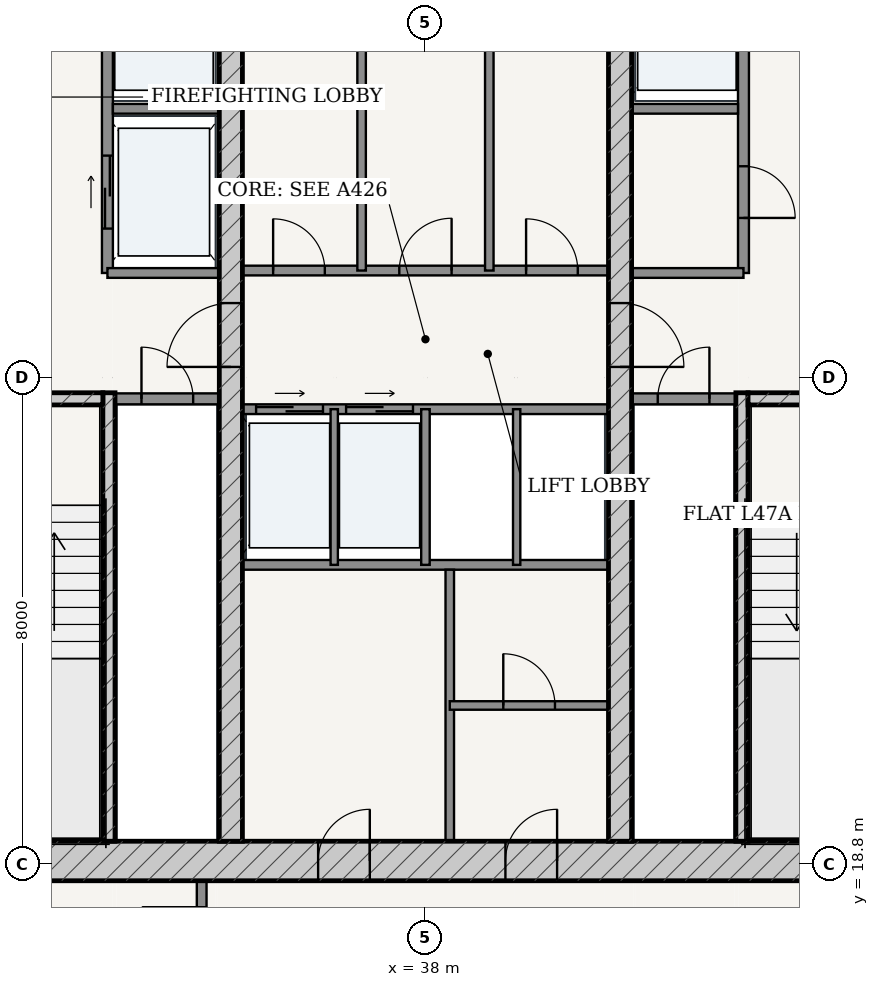
"""IFC4 building model, lengths in metres.
Left out: names, types, materials, properties, quantities, classifications, styles, units other than length and angle.
Written with IfcOpenShell. Run it as: python <this file> out.ifc"""

import sys

from ifc_helpers import new_model, si_unit, direction, frame, frame_2d, origin, place, context, subcontext, project, spatial, rectangle, extrude, source, transform, mapped, element, fill, save


model = new_model("IFC4")
c1 = context("Model", 3, precision=1e-05, world=origin(), true_north=direction((-0.2419218956, 0.970295726276)))
c2 = subcontext(c1, "Body", "Model", "MODEL_VIEW")
j1 = project(units=[si_unit("LENGTHUNIT", "METRE"), si_unit("PLANEANGLEUNIT", "RADIAN")], contexts=[c1])
p1 = place(None, origin())
s1 = spatial("IfcSite", under=j1, at=p1, CompositionType="ELEMENT")
p2 = place(p1, origin())
s2 = spatial("IfcBuilding", under=s1, at=p2, CompositionType="ELEMENT")
p3 = place(p2, frame((0.0, 0.0, 178.6)))
s3 = spatial("IfcBuildingStorey", under=s2, at=p3, CompositionType="ELEMENT", Elevation=178.6)
p4 = place(p3, frame((28.725, 18.85, 0.0), z_axis=(0.0, 0.0, 1.0), x_axis=(1.0, 0.0, 0.0)))
e1 = element("IfcWall", 1, at=p4, inside=s3, PredefinedType="SHEAR", context=c2, shape_type="SweptSolid", body=[
    extrude(rectangle(XDim=18.55, YDim=0.65, at=frame_2d((9.275, 0.0))), origin(), (0.0, 0.0, 1.0), 3.33),
])
p5 = place(p4, frame((7.51, 0.0, 0.0)))
e2 = element("IfcOpeningElement", 2, at=p5, cuts=e1, PredefinedType="OPENING", context=c2, shape_type="SweptSolid", body=[
    extrude(rectangle(XDim=0.85, YDim=2.1, at=frame_2d((0.425, 1.05))), frame((0.0, 0.335, 0.0), z_axis=(0.0, -1.0, 0.0), x_axis=(1.0, 0.0, 0.0)), (0.0, 0.0, 1.0), 0.67),
])
p6 = place(p4, frame((10.59, 0.0, 0.0)))
e3 = element("IfcOpeningElement", 3, at=p6, cuts=e1, PredefinedType="OPENING", context=c2, shape_type="SweptSolid", body=[
    extrude(rectangle(XDim=0.85, YDim=2.1, at=frame_2d((0.425, 1.05))), frame((0.0, 0.335, 0.0), z_axis=(0.0, -1.0, 0.0), x_axis=(1.0, 0.0, 0.0)), (0.0, 0.0, 1.0), 0.67),
])
p7 = place(p3, frame((32.795, 19.175, 0.0), z_axis=(0.0, 0.0, 1.0), x_axis=(0.0, 1.0, 0.0)))
e4 = element("IfcWall", 4, at=p7, inside=s3, PredefinedType="SOLIDWALL", context=c2, shape_type="SweptSolid", body=[
    extrude(rectangle(XDim=7.375, YDim=0.2, at=frame_2d((3.688, 0.0))), origin(), (0.0, 0.0, 1.0), 3.33),
])
p8 = place(p3, frame((29.375, 26.45, 0.0), z_axis=(0.0, 0.0, 1.0), x_axis=(1.0, 0.0, 0.0)))
e5 = element("IfcWall", 5, at=p8, inside=s3, PredefinedType="SOLIDWALL", context=c2, shape_type="SweptSolid", body=[
    extrude(rectangle(XDim=3.32, YDim=0.2, at=frame_2d((1.66, 0.0))), origin(), (0.0, 0.0, 1.0), 3.33),
])
p9 = place(p8, frame((1.185, 0.0, 0.0)))
e6 = element("IfcOpeningElement", 6, at=p9, cuts=e5, PredefinedType="OPENING", context=c2, shape_type="SweptSolid", body=[
    extrude(rectangle(XDim=0.95, YDim=2.15, at=frame_2d((0.475, 1.075))), frame((0.0, 0.11, 0.0), z_axis=(0.0, -1.0, 0.0), x_axis=(1.0, 0.0, 0.0)), (0.0, 0.0, 1.0), 0.22),
])
p10 = place(p3, frame((43.205, 19.175, 0.0), z_axis=(0.0, 0.0, 1.0), x_axis=(0.0, 1.0, 0.0)))
e7 = element("IfcWall", 7, at=p10, inside=s3, PredefinedType="SOLIDWALL", context=c2, shape_type="SweptSolid", body=[
    extrude(rectangle(XDim=7.375, YDim=0.2, at=frame_2d((3.688, 0.0))), origin(), (0.0, 0.0, 1.0), 3.33),
])
p11 = place(p3, frame((43.305, 26.45, 0.0), z_axis=(0.0, 0.0, 1.0), x_axis=(1.0, 0.0, 0.0)))
e8 = element("IfcWall", 8, at=p11, inside=s3, PredefinedType="SOLIDWALL", context=c2, shape_type="SweptSolid", body=[
    extrude(rectangle(XDim=3.32, YDim=0.2, at=frame_2d((1.66, 0.0))), origin(), (0.0, 0.0, 1.0), 3.33),
])
p12 = place(p11, frame((1.185, 0.0, 0.0)))
e9 = element("IfcOpeningElement", 9, at=p12, cuts=e8, PredefinedType="OPENING", context=c2, shape_type="SweptSolid", body=[
    extrude(rectangle(XDim=0.95, YDim=2.15, at=frame_2d((0.475, 1.075))), frame((0.0, 0.11, 0.0), z_axis=(0.0, -1.0, 0.0), x_axis=(1.0, 0.0, 0.0)), (0.0, 0.0, 1.0), 0.22),
])
p13 = place(p3, frame((34.8, 19.175, 0.0), z_axis=(0.0, 0.0, 1.0), x_axis=(0.0, 1.0, 0.0)))
e10 = element("IfcWall", 10, at=p13, inside=s3, PredefinedType="SHEAR", context=c2, shape_type="SweptSolid", body=[
    extrude(rectangle(XDim=15.25, YDim=0.38, at=frame_2d((7.625, 0.0))), origin(), (0.0, 0.0, 1.0), 3.33),
])
p14 = place(p13, frame((7.8, 0.0, 0.0)))
e11 = element("IfcOpeningElement", 11, at=p14, cuts=e10, PredefinedType="OPENING", context=c2, shape_type="SweptSolid", body=[
    extrude(rectangle(XDim=1.05, YDim=2.15, at=frame_2d((0.525, 1.075))), frame((0.0, 0.2, 0.0), z_axis=(0.0, -1.0, 0.0), x_axis=(1.0, 0.0, 0.0)), (0.0, 0.0, 1.0), 0.4),
])
p15 = place(p3, frame((41.2, 19.175, 0.0), z_axis=(0.0, 0.0, 1.0), x_axis=(0.0, 1.0, 0.0)))
e12 = element("IfcWall", 12, at=p15, inside=s3, PredefinedType="SHEAR", context=c2, shape_type="SweptSolid", body=[
    extrude(rectangle(XDim=15.25, YDim=0.38, at=frame_2d((7.625, 0.0))), origin(), (0.0, 0.0, 1.0), 3.33),
])
p16 = place(p15, frame((7.8, 0.0, 0.0)))
e13 = element("IfcOpeningElement", 13, at=p16, cuts=e12, PredefinedType="OPENING", context=c2, shape_type="SweptSolid", body=[
    extrude(rectangle(XDim=1.05, YDim=2.15, at=frame_2d((0.525, 1.075))), frame((0.0, 0.2, 0.0), z_axis=(0.0, -1.0, 0.0), x_axis=(1.0, 0.0, 0.0)), (0.0, 0.0, 1.0), 0.4),
])
p17 = place(p3, frame((32.9, 26.45, 0.0), z_axis=(0.0, 0.0, 1.0), x_axis=(1.0, 0.0, 0.0)))
e14 = element("IfcWall", 14, at=p17, inside=s3, PredefinedType="PARTITIONING", context=c2, shape_type="SweptSolid", body=[
    extrude(rectangle(XDim=1.71, YDim=0.18, at=frame_2d((0.855, 0.0))), origin(), (0.0, 0.0, 1.0), 3.33),
])
p18 = place(p17, frame((0.43, 0.0, 0.0)))
e15 = element("IfcOpeningElement", 15, at=p18, cuts=e14, PredefinedType="OPENING", context=c2, shape_type="SweptSolid", body=[
    extrude(rectangle(XDim=0.85, YDim=2.1, at=frame_2d((0.425, 1.05))), frame((0.0, 0.1, 0.0), z_axis=(0.0, -1.0, 0.0), x_axis=(1.0, 0.0, 0.0)), (0.0, 0.0, 1.0), 0.2),
])
p19 = place(p3, frame((41.39, 26.45, 0.0), z_axis=(0.0, 0.0, 1.0), x_axis=(1.0, 0.0, 0.0)))
e16 = element("IfcWall", 16, at=p19, inside=s3, PredefinedType="PARTITIONING", context=c2, shape_type="SweptSolid", body=[
    extrude(rectangle(XDim=1.71, YDim=0.18, at=frame_2d((0.855, 0.0))), origin(), (0.0, 0.0, 1.0), 3.33),
])
p20 = place(p19, frame((0.43, 0.0, 0.0)))
e17 = element("IfcOpeningElement", 17, at=p20, cuts=e16, PredefinedType="OPENING", context=c2, shape_type="SweptSolid", body=[
    extrude(rectangle(XDim=0.85, YDim=2.1, at=frame_2d((0.425, 1.05))), frame((0.0, 0.1, 0.0), z_axis=(0.0, -1.0, 0.0), x_axis=(1.0, 0.0, 0.0)), (0.0, 0.0, 1.0), 0.2),
])
p21 = place(p3, frame((32.77, 28.52, 0.0), z_axis=(0.0, 0.0, 1.0), x_axis=(0.0, 1.0, 0.0)))
e18 = element("IfcWall", 18, at=p21, inside=s3, PredefinedType="PARTITIONING", context=c2, shape_type="SweptSolid", body=[
    extrude(rectangle(XDim=5.905, YDim=0.18, at=frame_2d((2.953, 0.0))), origin(), (0.0, 0.0, 1.0), 3.33),
])
p22 = place(p21, frame((3.655, 0.0, 0.0)))
e19 = element("IfcOpeningElement", 19, at=p22, cuts=e18, PredefinedType="OPENING", context=c2, shape_type="SweptSolid", body=[
    extrude(rectangle(XDim=1.15, YDim=2.2, at=frame_2d((0.575, 1.1))), frame((0.0, 0.1, 0.0), z_axis=(0.0, -1.0, 0.0), x_axis=(1.0, 0.0, 0.0)), (0.0, 0.0, 1.0), 0.2),
])
p23 = place(p21, frame((0.73, 0.0, 0.0)))
e20 = element("IfcOpeningElement", 20, at=p23, cuts=e18, PredefinedType="OPENING", context=c2, shape_type="SweptSolid", body=[
    extrude(rectangle(XDim=1.2, YDim=2.25, at=frame_2d((0.6, 1.125))), frame((0.0, 0.1, 0.0), z_axis=(0.0, -1.0, 0.0), x_axis=(1.0, 0.0, 0.0)), (0.0, 0.0, 1.0), 0.2),
])
p24 = place(p3, frame((32.86, 31.22, 0.0), z_axis=(0.0, 0.0, 1.0), x_axis=(1.0, 0.0, 0.0)))
e21 = element("IfcWall", 21, at=p24, inside=s3, PredefinedType="PARTITIONING", context=c2, shape_type="SweptSolid", body=[
    extrude(rectangle(XDim=1.75, YDim=0.16, at=frame_2d((0.875, 0.0))), origin(), (0.0, 0.0, 1.0), 3.33),
])
p25 = place(p3, frame((32.77, 28.52, 0.0), z_axis=(0.0, 0.0, 1.0), x_axis=(1.0, 0.0, 0.0)))
e22 = element("IfcWall", 22, at=p25, inside=s3, PredefinedType="PARTITIONING", context=c2, shape_type="SweptSolid", body=[
    extrude(rectangle(XDim=1.84, YDim=0.16, at=frame_2d((0.92, 0.0))), origin(), (0.0, 0.0, 1.0), 3.33),
])
p26 = place(p3, frame((43.23, 28.52, 0.0), z_axis=(0.0, 0.0, 1.0), x_axis=(0.0, 1.0, 0.0)))
e23 = element("IfcWall", 23, at=p26, inside=s3, PredefinedType="PARTITIONING", context=c2, shape_type="SweptSolid", body=[
    extrude(rectangle(XDim=5.905, YDim=0.18, at=frame_2d((2.953, 0.0))), origin(), (0.0, 0.0, 1.0), 3.33),
])
p27 = place(p26, frame((0.905, 0.0, 0.0)))
e24 = element("IfcOpeningElement", 24, at=p27, cuts=e23, PredefinedType="OPENING", context=c2, shape_type="SweptSolid", body=[
    extrude(rectangle(XDim=0.85, YDim=2.1, at=frame_2d((0.425, 1.05))), frame((0.0, 0.1, 0.0), z_axis=(0.0, -1.0, 0.0), x_axis=(1.0, 0.0, 0.0)), (0.0, 0.0, 1.0), 0.2),
])
p28 = place(p26, frame((3.655, 0.0, 0.0)))
e25 = element("IfcOpeningElement", 25, at=p28, cuts=e23, PredefinedType="OPENING", context=c2, shape_type="SweptSolid", body=[
    extrude(rectangle(XDim=1.15, YDim=2.2, at=frame_2d((0.575, 1.1))), frame((0.0, 0.1, 0.0), z_axis=(0.0, -1.0, 0.0), x_axis=(1.0, 0.0, 0.0)), (0.0, 0.0, 1.0), 0.2),
])
p29 = place(p3, frame((41.39, 31.22, 0.0), z_axis=(0.0, 0.0, 1.0), x_axis=(1.0, 0.0, 0.0)))
e26 = element("IfcWall", 26, at=p29, inside=s3, PredefinedType="PARTITIONING", context=c2, shape_type="SweptSolid", body=[
    extrude(rectangle(XDim=1.75, YDim=0.16, at=frame_2d((0.875, 0.0))), origin(), (0.0, 0.0, 1.0), 3.33),
])
p30 = place(p3, frame((41.39, 28.52, 0.0), z_axis=(0.0, 0.0, 1.0), x_axis=(1.0, 0.0, 0.0)))
e27 = element("IfcWall", 27, at=p30, inside=s3, PredefinedType="PARTITIONING", context=c2, shape_type="SweptSolid", body=[
    extrude(rectangle(XDim=1.84, YDim=0.16, at=frame_2d((0.92, 0.0))), origin(), (0.0, 0.0, 1.0), 3.33),
])
p31 = place(p3, frame((34.99, 28.56, 0.0), z_axis=(0.0, 0.0, 1.0), x_axis=(1.0, 0.0, 0.0)))
e28 = element("IfcWall", 28, at=p31, inside=s3, PredefinedType="PARTITIONING", context=c2, shape_type="SweptSolid", body=[
    extrude(rectangle(XDim=6.02, YDim=0.16, at=frame_2d((3.01, 0.0))), origin(), (0.0, 0.0, 1.0), 3.33),
])
p32 = place(p31, frame((0.505, 0.0, 0.0)))
e29 = element("IfcOpeningElement", 29, at=p32, cuts=e28, PredefinedType="OPENING", context=c2, shape_type="SweptSolid", body=[
    extrude(rectangle(XDim=0.85, YDim=2.1, at=frame_2d((0.425, 1.05))), frame((0.0, 0.09, 0.0), z_axis=(0.0, -1.0, 0.0), x_axis=(1.0, 0.0, 0.0)), (0.0, 0.0, 1.0), 0.18),
])
p33 = place(p31, frame((2.58, 0.0, 0.0)))
e30 = element("IfcOpeningElement", 30, at=p33, cuts=e28, PredefinedType="OPENING", context=c2, shape_type="SweptSolid", body=[
    extrude(rectangle(XDim=0.86, YDim=2.1, at=frame_2d((0.43, 1.05))), frame((0.0, 0.09, 0.0), z_axis=(0.0, -1.0, 0.0), x_axis=(1.0, 0.0, 0.0)), (0.0, 0.0, 1.0), 0.18),
])
p34 = place(p31, frame((4.665, 0.0, 0.0)))
e31 = element("IfcOpeningElement", 31, at=p34, cuts=e28, PredefinedType="OPENING", context=c2, shape_type="SweptSolid", body=[
    extrude(rectangle(XDim=0.85, YDim=2.1, at=frame_2d((0.425, 1.05))), frame((0.0, 0.09, 0.0), z_axis=(0.0, -1.0, 0.0), x_axis=(1.0, 0.0, 0.0)), (0.0, 0.0, 1.0), 0.18),
])
for number, where, z_axis, x_axis in (
    (32, (36.95, 28.56, 0.0), (0.0, 0.0, 1.0), (0.0, 1.0, 0.0)),
    (33, (39.05, 28.56, 0.0), (0.0, 0.0, 1.0), (0.0, 1.0, 0.0)),
):
    element("IfcWall", number, at=place(p3, frame(where, z_axis=z_axis, x_axis=x_axis)), inside=s3, PredefinedType="PARTITIONING", context=c2, shape_type="SweptSolid", body=[
        extrude(rectangle(XDim=5.865, YDim=0.14, at=frame_2d((2.933, 0.0))), origin(), (0.0, 0.0, 1.0), 3.33),
    ])
p35 = place(p3, frame((34.99, 26.28, 0.0), z_axis=(0.0, 0.0, 1.0), x_axis=(1.0, 0.0, 0.0)))
e34 = element("IfcWall", 34, at=p35, inside=s3, PredefinedType="PARTITIONING", context=c2, shape_type="SweptSolid", body=[
    extrude(rectangle(XDim=6.02, YDim=0.16, at=frame_2d((3.01, 0.0))), origin(), (0.0, 0.0, 1.0), 3.33),
])
p36 = place(p35, frame((0.225, 0.0, 0.0)))
e35 = element("IfcOpeningElement", 35, at=p36, cuts=e34, PredefinedType="OPENING", context=c2, shape_type="SweptSolid", body=[
    extrude(rectangle(XDim=1.1, YDim=2.2, at=frame_2d((0.55, 1.1))), frame((0.0, 0.09, 0.0), z_axis=(0.0, -1.0, 0.0), x_axis=(1.0, 0.0, 0.0)), (0.0, 0.0, 1.0), 0.18),
])
p37 = place(p35, frame((1.705, 0.0, 0.0)))
e36 = element("IfcOpeningElement", 36, at=p37, cuts=e34, PredefinedType="OPENING", context=c2, shape_type="SweptSolid", body=[
    extrude(rectangle(XDim=1.1, YDim=2.2, at=frame_2d((0.55, 1.1))), frame((0.0, 0.09, 0.0), z_axis=(0.0, -1.0, 0.0), x_axis=(1.0, 0.0, 0.0)), (0.0, 0.0, 1.0), 0.18),
])
p38 = place(p3, frame((34.99, 23.72, 0.0), z_axis=(0.0, 0.0, 1.0), x_axis=(1.0, 0.0, 0.0)))
e37 = element("IfcWall", 37, at=p38, inside=s3, PredefinedType="PARTITIONING", context=c2, shape_type="SweptSolid", body=[
    extrude(rectangle(XDim=6.02, YDim=0.16, at=frame_2d((3.01, 0.0))), origin(), (0.0, 0.0, 1.0), 3.33),
])
p39 = place(p3, frame((36.5, 23.72, 0.0), z_axis=(0.0, 0.0, 1.0), x_axis=(0.0, 1.0, 0.0)))
e38 = element("IfcWall", 38, at=p39, inside=s3, PredefinedType="PARTITIONING", context=c2, shape_type="SweptSolid", body=[
    extrude(rectangle(XDim=2.56, YDim=0.12, at=frame_2d((1.28, 0.0))), origin(), (0.0, 0.0, 1.0), 3.33),
])
p40 = place(p3, frame((38.0, 23.72, 0.0), z_axis=(0.0, 0.0, 1.0), x_axis=(0.0, 1.0, 0.0)))
e39 = element("IfcWall", 39, at=p40, inside=s3, PredefinedType="PARTITIONING", context=c2, shape_type="SweptSolid", body=[
    extrude(rectangle(XDim=2.56, YDim=0.14, at=frame_2d((1.28, 0.0))), origin(), (0.0, 0.0, 1.0), 3.33),
])
p41 = place(p3, frame((39.5, 23.72, 0.0), z_axis=(0.0, 0.0, 1.0), x_axis=(0.0, 1.0, 0.0)))
e40 = element("IfcWall", 40, at=p41, inside=s3, PredefinedType="PARTITIONING", context=c2, shape_type="SweptSolid", body=[
    extrude(rectangle(XDim=2.56, YDim=0.12, at=frame_2d((1.28, 0.0))), origin(), (0.0, 0.0, 1.0), 3.33),
])
p42 = place(p3, frame((38.4, 19.175, 0.0), z_axis=(0.0, 0.0, 1.0), x_axis=(0.0, 1.0, 0.0)))
e41 = element("IfcWall", 41, at=p42, inside=s3, PredefinedType="PARTITIONING", context=c2, shape_type="SweptSolid", body=[
    extrude(rectangle(XDim=4.465, YDim=0.14, at=frame_2d((2.232, 0.0))), origin(), (0.0, 0.0, 1.0), 3.33),
])
p43 = place(p3, frame((38.4, 21.407, 0.0), z_axis=(0.0, 0.0, 1.0), x_axis=(1.0, 0.0, 0.0)))
e42 = element("IfcWall", 42, at=p43, inside=s3, PredefinedType="PARTITIONING", context=c2, shape_type="SweptSolid", body=[
    extrude(rectangle(XDim=2.61, YDim=0.14, at=frame_2d((1.305, 0.0))), origin(), (0.0, 0.0, 1.0), 3.33),
])
p44 = place(p43, frame((0.88, 0.0, 0.0)))
e43 = element("IfcOpeningElement", 43, at=p44, cuts=e42, PredefinedType="OPENING", context=c2, shape_type="SweptSolid", body=[
    extrude(rectangle(XDim=0.85, YDim=2.1, at=frame_2d((0.425, 1.05))), frame((0.0, 0.08, 0.0), z_axis=(0.0, -1.0, 0.0), x_axis=(1.0, 0.0, 0.0)), (0.0, 0.0, 1.0), 0.16),
])
p45 = place(p3, frame((34.32, 16.675, 0.0), z_axis=(0.0, 0.0, 1.0), x_axis=(0.0, 1.0, 0.0)))
e44 = element("IfcWall", 44, at=p45, inside=s3, PredefinedType="PARTITIONING", context=c2, shape_type="SweptSolid", body=[
    extrude(rectangle(XDim=1.85, YDim=0.16, at=frame_2d((0.925, 0.0))), origin(), (0.0, 0.0, 1.0), 3.33),
])
p46 = place(p45, frame((0.435, 0.0, 0.0)))
e45 = element("IfcOpeningElement", 45, at=p46, cuts=e44, PredefinedType="OPENING", context=c2, shape_type="SweptSolid", body=[
    extrude(rectangle(XDim=0.98, YDim=2.2, at=frame_2d((0.49, 1.1))), frame((0.0, 0.09, 0.0), z_axis=(0.0, -1.0, 0.0), x_axis=(1.0, 0.0, 0.0)), (0.0, 0.0, 1.0), 0.18),
])
m1 = source(origin(), c2, "Body", "SweptSolid", [
    extrude(rectangle(XDim=1.05, YDim=2.15, at=frame_2d((0.525, 1.075))), frame((0.0, 0.025, 0.0), z_axis=(0.0, -1.0, 0.0), x_axis=(1.0, 0.0, 0.0)), (0.0, 0.0, 1.0), 0.05),
])
p47 = place(p14, origin())
e46 = element("IfcDoor", 46, at=p47, inside=s3, OperationType="SINGLE_SWING_LEFT", PredefinedType="DOOR", context=c2, shape_type="MappedRepresentation", body=[
    mapped(m1, transform((0.0, 0.0, 0.0), scale=1.0)),
])
fill(e11, e46)
p48 = place(p16, frame((1.05, 0.0, 0.0), z_axis=(0.0, 0.0, 1.0), x_axis=(-1.0, 0.0, 0.0)))
e47 = element("IfcDoor", 47, at=p48, inside=s3, OperationType="SINGLE_SWING_RIGHT", PredefinedType="DOOR", context=c2, shape_type="MappedRepresentation", body=[
    mapped(m1, transform((0.0, 0.0, 0.0), scale=1.0)),
])
fill(e13, e47)
m2 = source(origin(), c2, "Body", "SweptSolid", [
    extrude(rectangle(XDim=0.85, YDim=2.1, at=frame_2d((0.425, 1.05))), frame((0.0, 0.025, 0.0), z_axis=(0.0, -1.0, 0.0), x_axis=(1.0, 0.0, 0.0)), (0.0, 0.0, 1.0), 0.05),
])
p49 = place(p18, origin())
e48 = element("IfcDoor", 48, at=p49, inside=s3, OperationType="SINGLE_SWING_LEFT", PredefinedType="DOOR", context=c2, shape_type="MappedRepresentation", body=[
    mapped(m2, transform((0.0, 0.0, 0.0), scale=1.0)),
])
fill(e15, e48)
p50 = place(p20, origin())
e49 = element("IfcDoor", 49, at=p50, inside=s3, OperationType="SINGLE_SWING_RIGHT", PredefinedType="DOOR", context=c2, shape_type="MappedRepresentation", body=[
    mapped(m2, transform((0.0, 0.0, 0.0), scale=1.0)),
])
fill(e17, e49)
p51 = place(p27, frame((0.85, 0.0, 0.0), z_axis=(0.0, 0.0, 1.0), x_axis=(-1.0, 0.0, 0.0)))
e50 = element("IfcDoor", 50, at=p51, inside=s3, OperationType="SINGLE_SWING_RIGHT", PredefinedType="DOOR", context=c2, shape_type="MappedRepresentation", body=[
    mapped(m2, transform((0.0, 0.0, 0.0), scale=1.0)),
])
fill(e24, e50)
p52 = place(p32, origin())
e51 = element("IfcDoor", 51, at=p52, inside=s3, OperationType="SINGLE_SWING_LEFT", PredefinedType="DOOR", context=c2, shape_type="MappedRepresentation", body=[
    mapped(m2, transform((0.0, 0.0, 0.0), scale=1.0)),
])
fill(e29, e51)
m3 = source(origin(), c2, "Body", "SweptSolid", [
    extrude(rectangle(XDim=0.86, YDim=2.1, at=frame_2d((0.43, 1.05))), frame((0.0, 0.025, 0.0), z_axis=(0.0, -1.0, 0.0), x_axis=(1.0, 0.0, 0.0)), (0.0, 0.0, 1.0), 0.05),
])
p53 = place(p33, origin())
e52 = element("IfcDoor", 52, at=p53, inside=s3, OperationType="SINGLE_SWING_RIGHT", PredefinedType="DOOR", context=c2, shape_type="MappedRepresentation", body=[
    mapped(m3, transform((0.0, 0.0, 0.0), scale=1.0)),
])
fill(e30, e52)
p54 = place(p34, origin())
e53 = element("IfcDoor", 53, at=p54, inside=s3, OperationType="SINGLE_SWING_LEFT", PredefinedType="DOOR", context=c2, shape_type="MappedRepresentation", body=[
    mapped(m2, transform((0.0, 0.0, 0.0), scale=1.0)),
])
fill(e31, e53)
p55 = place(p5, origin())
e54 = element("IfcDoor", 54, at=p55, inside=s3, OperationType="SINGLE_SWING_RIGHT", PredefinedType="DOOR", context=c2, shape_type="MappedRepresentation", body=[
    mapped(m2, transform((0.0, 0.0, 0.0), scale=1.0)),
])
fill(e2, e54)
p56 = place(p6, origin())
e55 = element("IfcDoor", 55, at=p56, inside=s3, OperationType="SINGLE_SWING_RIGHT", PredefinedType="DOOR", context=c2, shape_type="MappedRepresentation", body=[
    mapped(m2, transform((0.0, 0.0, 0.0), scale=1.0)),
])
fill(e3, e55)
p57 = place(p44, origin())
e56 = element("IfcDoor", 56, at=p57, inside=s3, OperationType="SINGLE_SWING_LEFT", PredefinedType="DOOR", context=c2, shape_type="MappedRepresentation", body=[
    mapped(m2, transform((0.0, 0.0, 0.0), scale=1.0)),
])
fill(e43, e56)
m4 = source(origin(), c2, "Body", "SweptSolid", [
    extrude(rectangle(XDim=1.2, YDim=2.25, at=frame_2d((0.6, 1.125))), frame((0.0, 0.025, 0.0), z_axis=(0.0, -1.0, 0.0), x_axis=(1.0, 0.0, 0.0)), (0.0, 0.0, 1.0), 0.05),
])
p58 = place(p23, origin())
e57 = element("IfcDoor", 57, at=p58, inside=s3, OperationType="DOUBLE_DOOR_SLIDING", PredefinedType="DOOR", context=c2, shape_type="MappedRepresentation", body=[
    mapped(m4, transform((0.0, 0.0, 0.0), scale=1.0)),
])
fill(e20, e57)
m5 = source(origin(), c2, "Body", "SweptSolid", [
    extrude(rectangle(XDim=1.1, YDim=2.2, at=frame_2d((0.55, 1.1))), frame((0.0, 0.025, 0.0), z_axis=(0.0, -1.0, 0.0), x_axis=(1.0, 0.0, 0.0)), (0.0, 0.0, 1.0), 0.05),
])
p59 = place(p36, origin())
e58 = element("IfcDoor", 58, at=p59, inside=s3, OperationType="DOUBLE_DOOR_SLIDING", PredefinedType="DOOR", context=c2, shape_type="MappedRepresentation", body=[
    mapped(m5, transform((0.0, 0.0, 0.0), scale=1.0)),
])
fill(e35, e58)
p60 = place(p37, origin())
e59 = element("IfcDoor", 59, at=p60, inside=s3, OperationType="DOUBLE_DOOR_SLIDING", PredefinedType="DOOR", context=c2, shape_type="MappedRepresentation", body=[
    mapped(m5, transform((0.0, 0.0, 0.0), scale=1.0)),
])
fill(e36, e59)
m6 = source(origin(), c2, "Body", "SweptSolid", [
    extrude(rectangle(XDim=0.98, YDim=2.2, at=frame_2d((0.49, 1.1))), frame((0.0, 0.025, 0.0), z_axis=(0.0, -1.0, 0.0), x_axis=(1.0, 0.0, 0.0)), (0.0, 0.0, 1.0), 0.05),
])
p61 = place(p46, origin())
e60 = element("IfcDoor", 60, at=p61, inside=s3, OperationType="SINGLE_SWING_RIGHT", PredefinedType="DOOR", context=c2, shape_type="MappedRepresentation", body=[
    mapped(m6, transform((0.0, 0.0, 0.0), scale=1.0)),
])
fill(e45, e60)
save(model, sys.argv[1])
